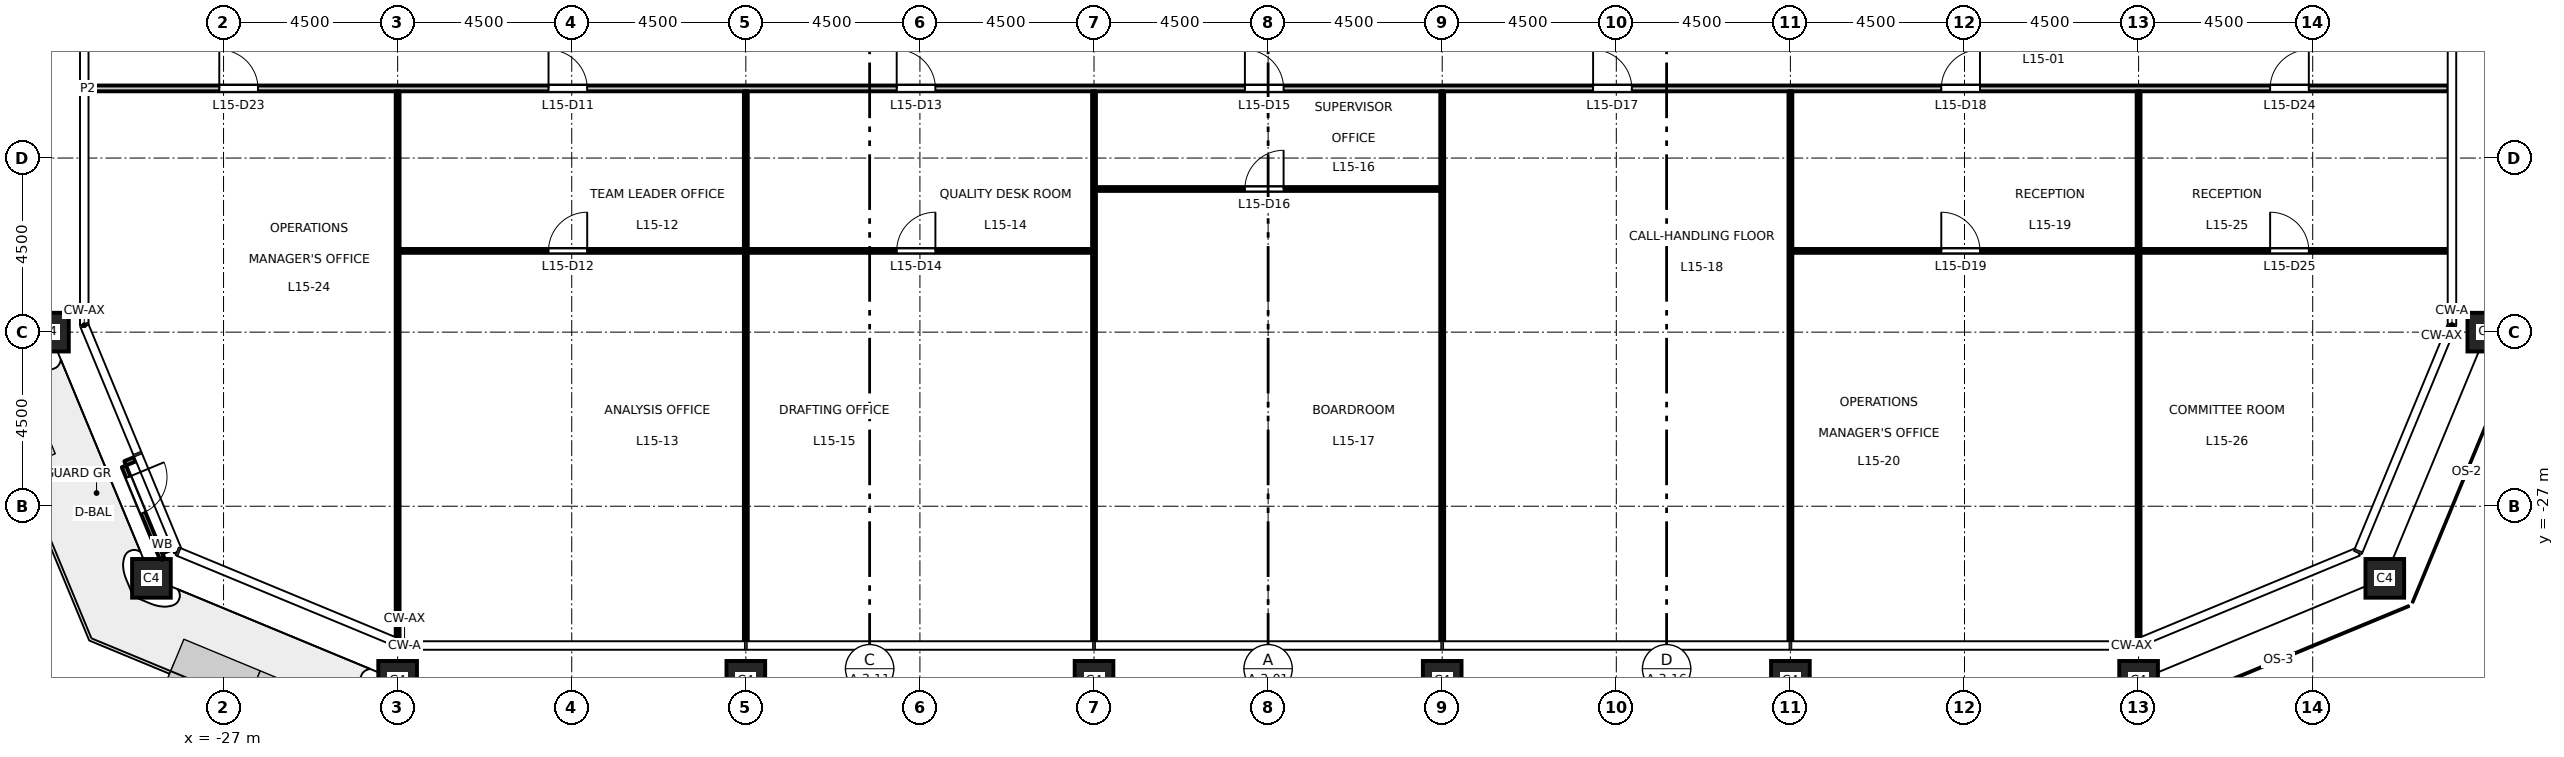
"""IFC4 building model, lengths in metres.
Left out: names, types, materials, properties, quantities, classifications, styles, units other than length and angle.
Written with IfcOpenShell. Run it as: python <this file> out.ifc"""

import sys

from ifc_helpers import new_model, si_unit, direction, frame, frame_2d, origin, origin_2d, place, context, subcontext, project, spatial, rectangle, hollow_rectangle, extrude, element, fill, save


model = new_model("IFC4")
c1 = context("Model", 3, precision=1e-05, world=origin(), true_north=direction((0.0, 1.0)))
c2 = subcontext(c1, "Body", "Model", "MODEL_VIEW")
j1 = project(units=[si_unit("LENGTHUNIT", "METRE"), si_unit("PLANEANGLEUNIT", "RADIAN")], contexts=[c1])
p1 = place(None, origin())
s1 = spatial("IfcSite", under=j1, at=p1, CompositionType="ELEMENT")
p2 = place(p1, origin())
s2 = spatial("IfcBuilding", under=s1, at=p2, CompositionType="ELEMENT")
p3 = place(p2, frame((0.0, 0.0, 71.7)))
s3 = spatial("IfcBuildingStorey", under=s2, at=p3, CompositionType="ELEMENT", Elevation=71.7)
for number, where, z_axis, x_axis in (
    (1, (-22.5, -31.5, 0.0), (0.0, 0.0, 1.0), (1.0, 0.0, 0.0)),
    (2, (-13.5, -31.5, 0.0), (0.0, 0.0, 1.0), (1.0, 0.0, 0.0)),
    (3, (-4.5, -31.5, 0.0), (0.0, 0.0, 1.0), (1.0, 0.0, 0.0)),
    (4, (4.5, -31.5, 0.0), (0.0, 0.0, 1.0), (1.0, 0.0, 0.0)),
    (5, (13.5, -31.5, 0.0), (0.0, 0.0, 1.0), (1.0, 0.0, 0.0)),
    (6, (22.5, -31.5, 0.0), (0.0, 0.0, 1.0), (1.0, 0.0, 0.0)),
    (7, (28.864, -28.864, 0.0), (0.0, 0.0, 1.0), (1.0, 0.0, 0.0)),
    (8, (31.5, -22.5, 0.0), (0.0, 0.0, 1.0), (1.0, 0.0, 0.0)),
    (9, (-31.5, -22.5, 0.0), (0.0, 0.0, 1.0), (1.0, 0.0, 0.0)),
    (10, (-28.864, -28.864, 0.0), (0.0, 0.0, 1.0), (1.0, 0.0, 0.0)),
):
    element("IfcColumn", number, at=place(p3, frame(where, z_axis=z_axis, x_axis=x_axis)), inside=s3, PredefinedType="COLUMN", context=c2, shape_type="SweptSolid", body=[
        extrude(hollow_rectangle(XDim=1.0, YDim=1.0, WallThickness=0.06, at=origin_2d()), origin(), (0.0, 0.0, 1.0), 4.5),
    ])
p4 = place(p3, frame((-29.285, -25.783, 0.0), z_axis=(0.0, 0.0, 1.0), x_axis=(-0.923772220778, -0.382942403136, 0.0)))
e11 = element("IfcWall", 11, at=p4, inside=s3, PredefinedType="STANDARD", context=c2, shape_type="SweptSolid", body=[
    extrude(rectangle(XDim=0.28, YDim=0.12, at=frame_2d((0.14, 0.0))), origin(), (0.0, 0.0, 1.0), 4.35),
])
p5 = place(p3, frame((-28.343, -28.058, 0.0), z_axis=(0.0, 0.0, 1.0), x_axis=(-0.923899985553, -0.382634050621, 0.0)))
e12 = element("IfcWall", 12, at=p5, inside=s3, PredefinedType="STANDARD", context=c2, shape_type="SweptSolid", body=[
    extrude(rectangle(XDim=0.28, YDim=0.12, at=frame_2d((0.14, 0.0))), origin(), (0.0, 0.0, 1.0), 4.35),
])
p6 = place(p3, frame((-29.576, -25.969, 0.0), z_axis=(0.0, 0.0, 1.0), x_axis=(0.382648460137, -0.923894017707, 0.0)))
e13 = element("IfcWall", 13, at=p6, inside=s3, PredefinedType="STANDARD", context=c2, shape_type="SweptSolid", body=[
    extrude(rectangle(XDim=2.592, YDim=0.12, at=frame_2d((1.296, 0.0))), origin(), (0.0, 0.0, 1.0), 4.35),
])
p7 = place(p6, frame((0.3, 0.0, 0.0)))
e14 = element("IfcOpeningElement", 14, at=p7, cuts=e13, PredefinedType="OPENING", context=c2, shape_type="SweptSolid", body=[
    extrude(rectangle(XDim=1.0, YDim=2.4, at=frame_2d((0.5, 1.2))), frame((0.0, 0.07, 0.0), z_axis=(0.0, -1.0, 0.0), x_axis=(1.0, 0.0, 0.0)), (0.0, 0.0, 1.0), 0.14),
])
p8 = place(p3, frame((-22.45, -20.4, 0.0), z_axis=(0.0, 0.0, 1.0), x_axis=(1.0, 0.0, 0.0)))
e15 = element("IfcWall", 15, at=p8, inside=s3, PredefinedType="PARTITIONING", context=c2, shape_type="SweptSolid", body=[
    extrude(rectangle(XDim=17.9, YDim=0.1, at=frame_2d((8.95, 0.0))), origin(), (0.0, 0.0, 1.0), 4.35),
])
p9 = place(p8, frame((3.85, 0.0, 0.0)))
e16 = element("IfcOpeningElement", 16, at=p9, cuts=e15, PredefinedType="OPENING", context=c2, shape_type="SweptSolid", body=[
    extrude(rectangle(XDim=1.0, YDim=2.1, at=frame_2d((0.5, 1.05))), frame((0.0, 0.06, 0.0), z_axis=(0.0, -1.0, 0.0), x_axis=(1.0, 0.0, 0.0)), (0.0, 0.0, 1.0), 0.12),
])
p10 = place(p8, frame((12.85, 0.0, 0.0)))
e17 = element("IfcOpeningElement", 17, at=p10, cuts=e15, PredefinedType="OPENING", context=c2, shape_type="SweptSolid", body=[
    extrude(rectangle(XDim=1.0, YDim=2.1, at=frame_2d((0.5, 1.05))), frame((0.0, 0.06, 0.0), z_axis=(0.0, -1.0, 0.0), x_axis=(1.0, 0.0, 0.0)), (0.0, 0.0, 1.0), 0.12),
])
p11 = place(p3, frame((13.55, -20.4, 0.0), z_axis=(0.0, 0.0, 1.0), x_axis=(1.0, 0.0, 0.0)))
e18 = element("IfcWall", 18, at=p11, inside=s3, PredefinedType="PARTITIONING", context=c2, shape_type="SweptSolid", body=[
    extrude(rectangle(XDim=16.96, YDim=0.1, at=frame_2d((8.48, 0.0))), origin(), (0.0, 0.0, 1.0), 4.35),
])
p12 = place(p11, frame((3.85, 0.0, 0.0)))
e19 = element("IfcOpeningElement", 19, at=p12, cuts=e18, PredefinedType="OPENING", context=c2, shape_type="SweptSolid", body=[
    extrude(rectangle(XDim=1.0, YDim=2.1, at=frame_2d((0.5, 1.05))), frame((0.0, 0.06, 0.0), z_axis=(0.0, -1.0, 0.0), x_axis=(1.0, 0.0, 0.0)), (0.0, 0.0, 1.0), 0.12),
])
p13 = place(p11, frame((12.35, 0.0, 0.0)))
e20 = element("IfcOpeningElement", 20, at=p13, cuts=e18, PredefinedType="OPENING", context=c2, shape_type="SweptSolid", body=[
    extrude(rectangle(XDim=1.0, YDim=2.1, at=frame_2d((0.5, 1.05))), frame((0.0, 0.06, 0.0), z_axis=(0.0, -1.0, 0.0), x_axis=(1.0, 0.0, 0.0)), (0.0, 0.0, 1.0), 0.12),
])
p14 = place(p3, frame((-4.45, -18.8, 0.0), z_axis=(0.0, 0.0, 1.0), x_axis=(1.0, 0.0, 0.0)))
e21 = element("IfcWall", 21, at=p14, inside=s3, PredefinedType="PARTITIONING", context=c2, shape_type="SweptSolid", body=[
    extrude(rectangle(XDim=8.9, YDim=0.1, at=frame_2d((4.45, 0.0))), origin(), (0.0, 0.0, 1.0), 4.35),
])
p15 = place(p14, frame((3.85, 0.0, 0.0)))
e22 = element("IfcOpeningElement", 22, at=p15, cuts=e21, PredefinedType="OPENING", context=c2, shape_type="SweptSolid", body=[
    extrude(rectangle(XDim=1.0, YDim=2.1, at=frame_2d((0.5, 1.05))), frame((0.0, 0.06, 0.0), z_axis=(0.0, -1.0, 0.0), x_axis=(1.0, 0.0, 0.0)), (0.0, 0.0, 1.0), 0.12),
])
p16 = place(p3, frame((-30.51, -16.2, 0.0), z_axis=(0.0, 0.0, 1.0), x_axis=(1.0, 0.0, 0.0)))
e23 = element("IfcWall", 23, at=p16, inside=s3, PredefinedType="PARTITIONING", context=c2, shape_type="SweptSolid", body=[
    extrude(rectangle(XDim=61.02, YDim=0.15, at=frame_2d((30.51, 0.0))), origin(), (0.0, 0.0, 1.0), 4.35),
])
p17 = place(p16, frame((11.91, 0.0, 0.0)))
e24 = element("IfcOpeningElement", 24, at=p17, cuts=e23, PredefinedType="OPENING", context=c2, shape_type="SweptSolid", body=[
    extrude(rectangle(XDim=1.0, YDim=2.1, at=frame_2d((0.5, 1.05))), frame((0.0, 0.085, 0.0), z_axis=(0.0, -1.0, 0.0), x_axis=(1.0, 0.0, 0.0)), (0.0, 0.0, 1.0), 0.17),
])
p18 = place(p16, frame((20.91, 0.0, 0.0)))
e25 = element("IfcOpeningElement", 25, at=p18, cuts=e23, PredefinedType="OPENING", context=c2, shape_type="SweptSolid", body=[
    extrude(rectangle(XDim=1.0, YDim=2.1, at=frame_2d((0.5, 1.05))), frame((0.0, 0.085, 0.0), z_axis=(0.0, -1.0, 0.0), x_axis=(1.0, 0.0, 0.0)), (0.0, 0.0, 1.0), 0.17),
])
p19 = place(p16, frame((29.91, 0.0, 0.0)))
e26 = element("IfcOpeningElement", 26, at=p19, cuts=e23, PredefinedType="OPENING", context=c2, shape_type="SweptSolid", body=[
    extrude(rectangle(XDim=1.0, YDim=2.1, at=frame_2d((0.5, 1.05))), frame((0.0, 0.085, 0.0), z_axis=(0.0, -1.0, 0.0), x_axis=(1.0, 0.0, 0.0)), (0.0, 0.0, 1.0), 0.17),
])
p20 = place(p16, frame((38.91, 0.0, 0.0)))
e27 = element("IfcOpeningElement", 27, at=p20, cuts=e23, PredefinedType="OPENING", context=c2, shape_type="SweptSolid", body=[
    extrude(rectangle(XDim=1.0, YDim=2.1, at=frame_2d((0.5, 1.05))), frame((0.0, 0.085, 0.0), z_axis=(0.0, -1.0, 0.0), x_axis=(1.0, 0.0, 0.0)), (0.0, 0.0, 1.0), 0.17),
])
p21 = place(p16, frame((47.91, 0.0, 0.0)))
e28 = element("IfcOpeningElement", 28, at=p21, cuts=e23, PredefinedType="OPENING", context=c2, shape_type="SweptSolid", body=[
    extrude(rectangle(XDim=1.0, YDim=2.1, at=frame_2d((0.5, 1.05))), frame((0.0, 0.085, 0.0), z_axis=(0.0, -1.0, 0.0), x_axis=(1.0, 0.0, 0.0)), (0.0, 0.0, 1.0), 0.17),
])
p22 = place(p16, frame((3.4, 0.0, 0.0)))
e29 = element("IfcOpeningElement", 29, at=p22, cuts=e23, PredefinedType="OPENING", context=c2, shape_type="SweptSolid", body=[
    extrude(rectangle(XDim=1.0, YDim=2.1, at=frame_2d((0.5, 1.05))), frame((0.0, 0.085, 0.0), z_axis=(0.0, -1.0, 0.0), x_axis=(1.0, 0.0, 0.0)), (0.0, 0.0, 1.0), 0.17),
])
p23 = place(p16, frame((56.41, 0.0, 0.0)))
e30 = element("IfcOpeningElement", 30, at=p23, cuts=e23, PredefinedType="OPENING", context=c2, shape_type="SweptSolid", body=[
    extrude(rectangle(XDim=1.0, YDim=2.1, at=frame_2d((0.5, 1.05))), frame((0.0, 0.085, 0.0), z_axis=(0.0, -1.0, 0.0), x_axis=(1.0, 0.0, 0.0)), (0.0, 0.0, 1.0), 0.17),
])
p24 = place(p3, frame((-22.5, -30.428, 0.0), z_axis=(0.0, 0.0, 1.0), x_axis=(0.0, 1.0, 0.0)))
e31 = element("IfcWall", 31, at=p24, inside=s3, PredefinedType="PARTITIONING", context=c2, shape_type="SweptSolid", body=[
    extrude(rectangle(XDim=14.153, YDim=0.1, at=frame_2d((7.077, 0.0))), origin(), (0.0, 0.0, 1.0), 3.35),
])
p25 = place(p3, frame((-13.5, -30.51, 0.0), z_axis=(0.0, 0.0, 1.0), x_axis=(0.0, 1.0, 0.0)))
e32 = element("IfcWall", 32, at=p25, inside=s3, PredefinedType="PARTITIONING", context=c2, shape_type="SweptSolid", body=[
    extrude(rectangle(XDim=10.06, YDim=0.1, at=frame_2d((5.03, 0.0))), origin(), (0.0, 0.0, 1.0), 3.35),
])
p26 = place(p3, frame((-13.5, -20.35, 0.0), z_axis=(0.0, 0.0, 1.0), x_axis=(0.0, 1.0, 0.0)))
e33 = element("IfcWall", 33, at=p26, inside=s3, PredefinedType="PARTITIONING", context=c2, shape_type="SweptSolid", body=[
    extrude(rectangle(XDim=4.075, YDim=0.1, at=frame_2d((2.038, 0.0))), origin(), (0.0, 0.0, 1.0), 3.35),
])
for number, where, z_axis, x_axis in (
    (34, (-4.5, -30.51, 0.0), (0.0, 0.0, 1.0), (0.0, 1.0, 0.0)),
    (35, (4.5, -30.51, 0.0), (0.0, 0.0, 1.0), (0.0, 1.0, 0.0)),
    (36, (13.5, -30.51, 0.0), (0.0, 0.0, 1.0), (0.0, 1.0, 0.0)),
):
    element("IfcWall", number, at=place(p3, frame(where, z_axis=z_axis, x_axis=x_axis)), inside=s3, PredefinedType="PARTITIONING", context=c2, shape_type="SweptSolid", body=[
        extrude(rectangle(XDim=14.235, YDim=0.1, at=frame_2d((7.118, 0.0))), origin(), (0.0, 0.0, 1.0), 3.35),
    ])
p27 = place(p3, frame((22.5, -30.428, 0.0), z_axis=(0.0, 0.0, 1.0), x_axis=(0.0, 1.0, 0.0)))
e37 = element("IfcWall", 37, at=p27, inside=s3, PredefinedType="PARTITIONING", context=c2, shape_type="SweptSolid", body=[
    extrude(rectangle(XDim=9.978, YDim=0.1, at=frame_2d((4.989, 0.0))), origin(), (0.0, 0.0, 1.0), 3.35),
])
p28 = place(p3, frame((22.5, -20.35, 0.0), z_axis=(0.0, 0.0, 1.0), x_axis=(0.0, 1.0, 0.0)))
e38 = element("IfcWall", 38, at=p28, inside=s3, PredefinedType="PARTITIONING", context=c2, shape_type="SweptSolid", body=[
    extrude(rectangle(XDim=4.075, YDim=0.1, at=frame_2d((2.038, 0.0))), origin(), (0.0, 0.0, 1.0), 3.35),
])
p29 = place(p7, origin())
e39 = element("IfcDoor", 39, at=p29, inside=s3, OperationType="SINGLE_SWING_LEFT", PredefinedType="DOOR", context=c2, shape_type="SweptSolid", body=[
    extrude(rectangle(XDim=1.0, YDim=2.4, at=frame_2d((0.5, 1.2))), frame((0.0, 0.025, 0.0), z_axis=(0.0, -1.0, 0.0), x_axis=(1.0, 0.0, 0.0)), (0.0, 0.0, 1.0), 0.05),
])
fill(e14, e39)
p30 = place(p17, origin())
e40 = element("IfcDoor", 40, at=p30, inside=s3, OperationType="SINGLE_SWING_LEFT", PredefinedType="DOOR", context=c2, shape_type="SweptSolid", body=[
    extrude(rectangle(XDim=1.0, YDim=2.1, at=frame_2d((0.5, 1.05))), frame((0.0, 0.025, 0.0), z_axis=(0.0, -1.0, 0.0), x_axis=(1.0, 0.0, 0.0)), (0.0, 0.0, 1.0), 0.05),
])
fill(e24, e40)
p31 = place(p9, origin())
e41 = element("IfcDoor", 41, at=p31, inside=s3, OperationType="SINGLE_SWING_RIGHT", PredefinedType="DOOR", context=c2, shape_type="SweptSolid", body=[
    extrude(rectangle(XDim=1.0, YDim=2.1, at=frame_2d((0.5, 1.05))), frame((0.0, 0.025, 0.0), z_axis=(0.0, -1.0, 0.0), x_axis=(1.0, 0.0, 0.0)), (0.0, 0.0, 1.0), 0.05),
])
fill(e16, e41)
p32 = place(p18, origin())
e42 = element("IfcDoor", 42, at=p32, inside=s3, OperationType="SINGLE_SWING_LEFT", PredefinedType="DOOR", context=c2, shape_type="SweptSolid", body=[
    extrude(rectangle(XDim=1.0, YDim=2.1, at=frame_2d((0.5, 1.05))), frame((0.0, 0.025, 0.0), z_axis=(0.0, -1.0, 0.0), x_axis=(1.0, 0.0, 0.0)), (0.0, 0.0, 1.0), 0.05),
])
fill(e25, e42)
p33 = place(p10, origin())
e43 = element("IfcDoor", 43, at=p33, inside=s3, OperationType="SINGLE_SWING_RIGHT", PredefinedType="DOOR", context=c2, shape_type="SweptSolid", body=[
    extrude(rectangle(XDim=1.0, YDim=2.1, at=frame_2d((0.5, 1.05))), frame((0.0, 0.025, 0.0), z_axis=(0.0, -1.0, 0.0), x_axis=(1.0, 0.0, 0.0)), (0.0, 0.0, 1.0), 0.05),
])
fill(e17, e43)
p34 = place(p19, origin())
e44 = element("IfcDoor", 44, at=p34, inside=s3, OperationType="SINGLE_SWING_LEFT", PredefinedType="DOOR", context=c2, shape_type="SweptSolid", body=[
    extrude(rectangle(XDim=1.0, YDim=2.1, at=frame_2d((0.5, 1.05))), frame((0.0, 0.025, 0.0), z_axis=(0.0, -1.0, 0.0), x_axis=(1.0, 0.0, 0.0)), (0.0, 0.0, 1.0), 0.05),
])
fill(e26, e44)
p35 = place(p15, origin())
e45 = element("IfcDoor", 45, at=p35, inside=s3, OperationType="SINGLE_SWING_RIGHT", PredefinedType="DOOR", context=c2, shape_type="SweptSolid", body=[
    extrude(rectangle(XDim=1.0, YDim=2.1, at=frame_2d((0.5, 1.05))), frame((0.0, 0.025, 0.0), z_axis=(0.0, -1.0, 0.0), x_axis=(1.0, 0.0, 0.0)), (0.0, 0.0, 1.0), 0.05),
])
fill(e22, e45)
p36 = place(p20, origin())
e46 = element("IfcDoor", 46, at=p36, inside=s3, OperationType="SINGLE_SWING_LEFT", PredefinedType="DOOR", context=c2, shape_type="SweptSolid", body=[
    extrude(rectangle(XDim=1.0, YDim=2.1, at=frame_2d((0.5, 1.05))), frame((0.0, 0.025, 0.0), z_axis=(0.0, -1.0, 0.0), x_axis=(1.0, 0.0, 0.0)), (0.0, 0.0, 1.0), 0.05),
])
fill(e27, e46)
p37 = place(p21, origin())
e47 = element("IfcDoor", 47, at=p37, inside=s3, OperationType="SINGLE_SWING_RIGHT", PredefinedType="DOOR", context=c2, shape_type="SweptSolid", body=[
    extrude(rectangle(XDim=1.0, YDim=2.1, at=frame_2d((0.5, 1.05))), frame((0.0, 0.025, 0.0), z_axis=(0.0, -1.0, 0.0), x_axis=(1.0, 0.0, 0.0)), (0.0, 0.0, 1.0), 0.05),
])
fill(e28, e47)
p38 = place(p12, origin())
e48 = element("IfcDoor", 48, at=p38, inside=s3, OperationType="SINGLE_SWING_LEFT", PredefinedType="DOOR", context=c2, shape_type="SweptSolid", body=[
    extrude(rectangle(XDim=1.0, YDim=2.1, at=frame_2d((0.5, 1.05))), frame((0.0, 0.025, 0.0), z_axis=(0.0, -1.0, 0.0), x_axis=(1.0, 0.0, 0.0)), (0.0, 0.0, 1.0), 0.05),
])
fill(e19, e48)
p39 = place(p22, origin())
e49 = element("IfcDoor", 49, at=p39, inside=s3, OperationType="SINGLE_SWING_LEFT", PredefinedType="DOOR", context=c2, shape_type="SweptSolid", body=[
    extrude(rectangle(XDim=1.0, YDim=2.1, at=frame_2d((0.5, 1.05))), frame((0.0, 0.025, 0.0), z_axis=(0.0, -1.0, 0.0), x_axis=(1.0, 0.0, 0.0)), (0.0, 0.0, 1.0), 0.05),
])
fill(e29, e49)
p40 = place(p23, origin())
e50 = element("IfcDoor", 50, at=p40, inside=s3, OperationType="SINGLE_SWING_RIGHT", PredefinedType="DOOR", context=c2, shape_type="SweptSolid", body=[
    extrude(rectangle(XDim=1.0, YDim=2.1, at=frame_2d((0.5, 1.05))), frame((0.0, 0.025, 0.0), z_axis=(0.0, -1.0, 0.0), x_axis=(1.0, 0.0, 0.0)), (0.0, 0.0, 1.0), 0.05),
])
fill(e30, e50)
p41 = place(p13, origin())
e51 = element("IfcDoor", 51, at=p41, inside=s3, OperationType="SINGLE_SWING_LEFT", PredefinedType="DOOR", context=c2, shape_type="SweptSolid", body=[
    extrude(rectangle(XDim=1.0, YDim=2.1, at=frame_2d((0.5, 1.05))), frame((0.0, 0.025, 0.0), z_axis=(0.0, -1.0, 0.0), x_axis=(1.0, 0.0, 0.0)), (0.0, 0.0, 1.0), 0.05),
])
fill(e20, e51)
save(model, sys.argv[1])
